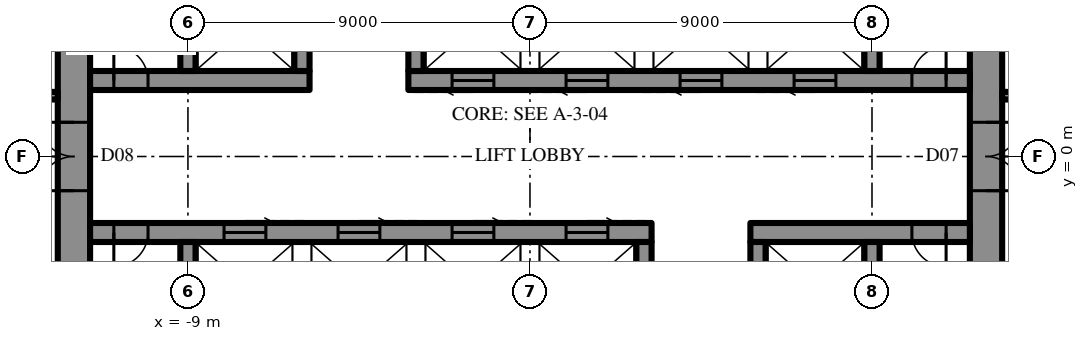
"""IFC4 building model, lengths in metres.
Left out: names, types, materials, properties, quantities, classifications, styles, units other than length and angle.
Written with IfcOpenShell. Run it as: python <this file> out.ifc"""

import sys

from ifc_helpers import new_model, si_unit, direction, frame, frame_2d, origin, place, context, subcontext, project, spatial, rectangle, extrude, element, fill, save


model = new_model("IFC4")
c1 = context("Model", 3, precision=1e-05, world=origin(), true_north=direction((0.0, 1.0)))
c2 = subcontext(c1, "Body", "Model", "MODEL_VIEW")
j1 = project(units=[si_unit("LENGTHUNIT", "METRE"), si_unit("PLANEANGLEUNIT", "RADIAN")], contexts=[c1])
p1 = place(None, origin())
s1 = spatial("IfcSite", under=j1, at=p1, CompositionType="ELEMENT")
p2 = place(p1, origin())
s2 = spatial("IfcBuilding", under=s1, at=p2, CompositionType="ELEMENT")
p3 = place(p2, frame((0.0, 0.0, 324.1)))
s3 = spatial("IfcBuildingStorey", under=s2, at=p3, CompositionType="ELEMENT", Elevation=324.1)
p4 = place(p3, frame((12.0, -10.7, 0.0), z_axis=(0.0, 0.0, 1.0), x_axis=(0.0, 1.0, 0.0)))
e1 = element("IfcWall", 1, at=p4, inside=s3, PredefinedType="SHEAR", context=c2, shape_type="SweptSolid", body=[
    extrude(rectangle(XDim=21.4, YDim=0.85, at=frame_2d((10.7, 0.0))), origin(), (0.0, 0.0, 1.0), 4.2),
])
p5 = place(p4, frame((9.8, 0.0, 0.0)))
e2 = element("IfcOpeningElement", 2, at=p5, cuts=e1, PredefinedType="OPENING", context=c2, shape_type="SweptSolid", body=[
    extrude(rectangle(XDim=1.8, YDim=2.4, at=frame_2d((0.9, 1.2))), frame((0.0, 0.435, 0.0), z_axis=(0.0, -1.0, 0.0), x_axis=(1.0, 0.0, 0.0)), (0.0, 0.0, 1.0), 0.87),
])
p6 = place(p3, frame((-12.0, 10.7, 0.0), z_axis=(0.0, 0.0, 1.0), x_axis=(0.0, -1.0, 0.0)))
e3 = element("IfcWall", 3, at=p6, inside=s3, PredefinedType="SHEAR", context=c2, shape_type="SweptSolid", body=[
    extrude(rectangle(XDim=21.4, YDim=0.85, at=frame_2d((10.7, 0.0))), origin(), (0.0, 0.0, 1.0), 4.2),
])
p7 = place(p6, frame((9.8, 0.0, 0.0)))
e4 = element("IfcOpeningElement", 4, at=p7, cuts=e3, PredefinedType="OPENING", context=c2, shape_type="SweptSolid", body=[
    extrude(rectangle(XDim=1.8, YDim=2.4, at=frame_2d((0.9, 1.2))), frame((0.0, 0.435, 0.0), z_axis=(0.0, -1.0, 0.0), x_axis=(1.0, 0.0, 0.0)), (0.0, 0.0, 1.0), 0.87),
])
p8 = place(p3, frame((-11.575, 2.0, 0.0), z_axis=(0.0, 0.0, 1.0), x_axis=(1.0, 0.0, 0.0)))
e5 = element("IfcWall", 5, at=p8, inside=s3, PredefinedType="SHEAR", context=c2, shape_type="SweptSolid", body=[
    extrude(rectangle(XDim=5.775, YDim=0.5, at=frame_2d((2.887, 0.0))), origin(), (0.0, 0.0, 1.0), 4.2),
])
p9 = place(p8, frame((0.625, 0.0, 0.0)))
e6 = element("IfcOpeningElement", 6, at=p9, cuts=e5, PredefinedType="OPENING", context=c2, shape_type="SweptSolid", body=[
    extrude(rectangle(XDim=0.9, YDim=2.2, at=frame_2d((0.45, 1.1))), frame((0.0, 0.26, 0.0), z_axis=(0.0, -1.0, 0.0), x_axis=(1.0, 0.0, 0.0)), (0.0, 0.0, 1.0), 0.52),
])
p10 = place(p3, frame((-3.2, 2.0, 0.0), z_axis=(0.0, 0.0, 1.0), x_axis=(1.0, 0.0, 0.0)))
e7 = element("IfcWall", 7, at=p10, inside=s3, PredefinedType="SHEAR", context=c2, shape_type="SweptSolid", body=[
    extrude(rectangle(XDim=14.775, YDim=0.5, at=frame_2d((7.387, 0.0))), origin(), (0.0, 0.0, 1.0), 4.2),
])
p11 = place(p10, frame((13.25, 0.0, 0.0)))
e8 = element("IfcOpeningElement", 8, at=p11, cuts=e7, PredefinedType="OPENING", context=c2, shape_type="SweptSolid", body=[
    extrude(rectangle(XDim=0.9, YDim=2.2, at=frame_2d((0.45, 1.1))), frame((0.0, 0.26, 0.0), z_axis=(0.0, -1.0, 0.0), x_axis=(1.0, 0.0, 0.0)), (0.0, 0.0, 1.0), 0.52),
])
p12 = place(p10, frame((1.15, 0.0, 0.0)))
e9 = element("IfcOpeningElement", 9, at=p12, cuts=e7, PredefinedType="OPENING", context=c2, shape_type="SweptSolid", body=[
    extrude(rectangle(XDim=1.1, YDim=2.2, at=frame_2d((0.55, 1.1))), frame((0.0, 0.26, 0.0), z_axis=(0.0, -1.0, 0.0), x_axis=(1.0, 0.0, 0.0)), (0.0, 0.0, 1.0), 0.52),
])
p13 = place(p10, frame((4.15, 0.0, 0.0)))
e10 = element("IfcOpeningElement", 10, at=p13, cuts=e7, PredefinedType="OPENING", context=c2, shape_type="SweptSolid", body=[
    extrude(rectangle(XDim=1.1, YDim=2.2, at=frame_2d((0.55, 1.1))), frame((0.0, 0.26, 0.0), z_axis=(0.0, -1.0, 0.0), x_axis=(1.0, 0.0, 0.0)), (0.0, 0.0, 1.0), 0.52),
])
p14 = place(p10, frame((7.15, 0.0, 0.0)))
e11 = element("IfcOpeningElement", 11, at=p14, cuts=e7, PredefinedType="OPENING", context=c2, shape_type="SweptSolid", body=[
    extrude(rectangle(XDim=1.1, YDim=2.2, at=frame_2d((0.55, 1.1))), frame((0.0, 0.26, 0.0), z_axis=(0.0, -1.0, 0.0), x_axis=(1.0, 0.0, 0.0)), (0.0, 0.0, 1.0), 0.52),
])
p15 = place(p10, frame((10.15, 0.0, 0.0)))
e12 = element("IfcOpeningElement", 12, at=p15, cuts=e7, PredefinedType="OPENING", context=c2, shape_type="SweptSolid", body=[
    extrude(rectangle(XDim=1.1, YDim=2.2, at=frame_2d((0.55, 1.1))), frame((0.0, 0.26, 0.0), z_axis=(0.0, -1.0, 0.0), x_axis=(1.0, 0.0, 0.0)), (0.0, 0.0, 1.0), 0.52),
])
for number, where, z_axis, x_axis in (
    (13, (-9.0, 2.25, 0.0), (0.0, 0.0, 1.0), (0.0, 1.0, 0.0)),
    (14, (-6.0, 2.25, 0.0), (0.0, 0.0, 1.0), (0.0, 1.0, 0.0)),
    (15, (-3.0, 2.25, 0.0), (0.0, 0.0, 1.0), (0.0, 1.0, 0.0)),
    (16, (9.0, 2.25, 0.0), (0.0, 0.0, 1.0), (0.0, 1.0, 0.0)),
):
    element("IfcWall", number, at=place(p3, frame(where, z_axis=z_axis, x_axis=x_axis)), inside=s3, PredefinedType="SHEAR", context=c2, shape_type="SweptSolid", body=[
        extrude(rectangle(XDim=2.3, YDim=0.4, at=frame_2d((1.15, 0.0))), origin(), (0.0, 0.0, 1.0), 4.2),
    ])
p16 = place(p3, frame((11.575, -2.0, 0.0), z_axis=(0.0, 0.0, 1.0), x_axis=(-1.0, 0.0, 0.0)))
e17 = element("IfcWall", 17, at=p16, inside=s3, PredefinedType="SHEAR", context=c2, shape_type="SweptSolid", body=[
    extrude(rectangle(XDim=5.775, YDim=0.5, at=frame_2d((2.887, 0.0))), origin(), (0.0, 0.0, 1.0), 4.2),
])
p17 = place(p16, frame((0.625, 0.0, 0.0)))
e18 = element("IfcOpeningElement", 18, at=p17, cuts=e17, PredefinedType="OPENING", context=c2, shape_type="SweptSolid", body=[
    extrude(rectangle(XDim=0.9, YDim=2.2, at=frame_2d((0.45, 1.1))), frame((0.0, 0.26, 0.0), z_axis=(0.0, -1.0, 0.0), x_axis=(1.0, 0.0, 0.0)), (0.0, 0.0, 1.0), 0.52),
])
p18 = place(p3, frame((3.2, -2.0, 0.0), z_axis=(0.0, 0.0, 1.0), x_axis=(-1.0, 0.0, 0.0)))
e19 = element("IfcWall", 19, at=p18, inside=s3, PredefinedType="SHEAR", context=c2, shape_type="SweptSolid", body=[
    extrude(rectangle(XDim=14.775, YDim=0.5, at=frame_2d((7.387, 0.0))), origin(), (0.0, 0.0, 1.0), 4.2),
])
p19 = place(p18, frame((13.25, 0.0, 0.0)))
e20 = element("IfcOpeningElement", 20, at=p19, cuts=e19, PredefinedType="OPENING", context=c2, shape_type="SweptSolid", body=[
    extrude(rectangle(XDim=0.9, YDim=2.2, at=frame_2d((0.45, 1.1))), frame((0.0, 0.26, 0.0), z_axis=(0.0, -1.0, 0.0), x_axis=(1.0, 0.0, 0.0)), (0.0, 0.0, 1.0), 0.52),
])
p20 = place(p18, frame((1.15, 0.0, 0.0)))
e21 = element("IfcOpeningElement", 21, at=p20, cuts=e19, PredefinedType="OPENING", context=c2, shape_type="SweptSolid", body=[
    extrude(rectangle(XDim=1.1, YDim=2.2, at=frame_2d((0.55, 1.1))), frame((0.0, 0.26, 0.0), z_axis=(0.0, -1.0, 0.0), x_axis=(1.0, 0.0, 0.0)), (0.0, 0.0, 1.0), 0.52),
])
p21 = place(p18, frame((4.15, 0.0, 0.0)))
e22 = element("IfcOpeningElement", 22, at=p21, cuts=e19, PredefinedType="OPENING", context=c2, shape_type="SweptSolid", body=[
    extrude(rectangle(XDim=1.1, YDim=2.2, at=frame_2d((0.55, 1.1))), frame((0.0, 0.26, 0.0), z_axis=(0.0, -1.0, 0.0), x_axis=(1.0, 0.0, 0.0)), (0.0, 0.0, 1.0), 0.52),
])
p22 = place(p18, frame((7.15, 0.0, 0.0)))
e23 = element("IfcOpeningElement", 23, at=p22, cuts=e19, PredefinedType="OPENING", context=c2, shape_type="SweptSolid", body=[
    extrude(rectangle(XDim=1.1, YDim=2.2, at=frame_2d((0.55, 1.1))), frame((0.0, 0.26, 0.0), z_axis=(0.0, -1.0, 0.0), x_axis=(1.0, 0.0, 0.0)), (0.0, 0.0, 1.0), 0.52),
])
p23 = place(p18, frame((10.15, 0.0, 0.0)))
e24 = element("IfcOpeningElement", 24, at=p23, cuts=e19, PredefinedType="OPENING", context=c2, shape_type="SweptSolid", body=[
    extrude(rectangle(XDim=1.1, YDim=2.2, at=frame_2d((0.55, 1.1))), frame((0.0, 0.26, 0.0), z_axis=(0.0, -1.0, 0.0), x_axis=(1.0, 0.0, 0.0)), (0.0, 0.0, 1.0), 0.52),
])
for number, where, z_axis, x_axis in (
    (25, (9.0, -2.25, 0.0), (0.0, 0.0, 1.0), (0.0, -1.0, 0.0)),
    (26, (6.0, -2.25, 0.0), (0.0, 0.0, 1.0), (0.0, -1.0, 0.0)),
    (27, (3.0, -2.25, 0.0), (0.0, 0.0, 1.0), (0.0, -1.0, 0.0)),
    (28, (-9.0, -2.25, 0.0), (0.0, 0.0, 1.0), (0.0, -1.0, 0.0)),
):
    element("IfcWall", number, at=place(p3, frame(where, z_axis=z_axis, x_axis=x_axis)), inside=s3, PredefinedType="SHEAR", context=c2, shape_type="SweptSolid", body=[
        extrude(rectangle(XDim=2.3, YDim=0.4, at=frame_2d((1.15, 0.0))), origin(), (0.0, 0.0, 1.0), 4.2),
    ])
p24 = place(p3, frame((12.425, 1.6, 0.0), z_axis=(0.0, 0.0, 1.0), x_axis=(1.0, 0.0, 0.0)))
e29 = element("IfcWall", 29, at=p24, inside=s3, PredefinedType="PARTITIONING", context=c2, shape_type="SweptSolid", body=[
    extrude(rectangle(XDim=16.327, YDim=0.2, at=frame_2d((8.164, 0.0))), origin(), (0.0, 0.0, 1.0), 4.0),
])
p25 = place(p24, frame((1.133, 0.0, 0.0)))
e30 = element("IfcOpeningElement", 30, at=p25, cuts=e29, PredefinedType="OPENING", context=c2, shape_type="SweptSolid", body=[
    extrude(rectangle(XDim=1.0, YDim=2.2, at=frame_2d((0.5, 1.1))), frame((0.0, 0.11, 0.0), z_axis=(0.0, -1.0, 0.0), x_axis=(1.0, 0.0, 0.0)), (0.0, 0.0, 1.0), 0.22),
])
p26 = place(p3, frame((-12.425, 1.6, 0.0), z_axis=(0.0, 0.0, 1.0), x_axis=(-1.0, 0.0, 0.0)))
e31 = element("IfcWall", 31, at=p26, inside=s3, PredefinedType="PARTITIONING", context=c2, shape_type="SweptSolid", body=[
    extrude(rectangle(XDim=16.327, YDim=0.2, at=frame_2d((8.164, 0.0))), origin(), (0.0, 0.0, 1.0), 4.0),
])
p27 = place(p26, frame((1.133, 0.0, 0.0)))
e32 = element("IfcOpeningElement", 32, at=p27, cuts=e31, PredefinedType="OPENING", context=c2, shape_type="SweptSolid", body=[
    extrude(rectangle(XDim=1.0, YDim=2.2, at=frame_2d((0.5, 1.1))), frame((0.0, 0.11, 0.0), z_axis=(0.0, -1.0, 0.0), x_axis=(1.0, 0.0, 0.0)), (0.0, 0.0, 1.0), 0.22),
])
p28 = place(p5, frame((1.8, 0.0, 0.0), z_axis=(0.0, 0.0, 1.0), x_axis=(-1.0, 0.0, 0.0)))
e33 = element("IfcDoor", 33, at=p28, inside=s3, OperationType="DOUBLE_DOOR_SINGLE_SWING", PredefinedType="DOOR", context=c2, shape_type="SweptSolid", body=[
    extrude(rectangle(XDim=1.8, YDim=2.4, at=frame_2d((0.9, 1.2))), frame((0.0, 0.025, 0.0), z_axis=(0.0, -1.0, 0.0), x_axis=(1.0, 0.0, 0.0)), (0.0, 0.0, 1.0), 0.05),
])
fill(e2, e33)
p29 = place(p7, frame((1.8, 0.0, 0.0), z_axis=(0.0, 0.0, 1.0), x_axis=(-1.0, 0.0, 0.0)))
e34 = element("IfcDoor", 34, at=p29, inside=s3, OperationType="DOUBLE_DOOR_SINGLE_SWING", PredefinedType="DOOR", context=c2, shape_type="SweptSolid", body=[
    extrude(rectangle(XDim=1.8, YDim=2.4, at=frame_2d((0.9, 1.2))), frame((0.0, 0.025, 0.0), z_axis=(0.0, -1.0, 0.0), x_axis=(1.0, 0.0, 0.0)), (0.0, 0.0, 1.0), 0.05),
])
fill(e4, e34)
p30 = place(p9, origin())
e35 = element("IfcDoor", 35, at=p30, inside=s3, OperationType="SINGLE_SWING_RIGHT", PredefinedType="DOOR", context=c2, shape_type="SweptSolid", body=[
    extrude(rectangle(XDim=0.9, YDim=2.2, at=frame_2d((0.45, 1.1))), frame((0.0, 0.025, 0.0), z_axis=(0.0, -1.0, 0.0), x_axis=(1.0, 0.0, 0.0)), (0.0, 0.0, 1.0), 0.05),
])
fill(e6, e35)
p31 = place(p11, origin())
e36 = element("IfcDoor", 36, at=p31, inside=s3, OperationType="SINGLE_SWING_LEFT", PredefinedType="DOOR", context=c2, shape_type="SweptSolid", body=[
    extrude(rectangle(XDim=0.9, YDim=2.2, at=frame_2d((0.45, 1.1))), frame((0.0, 0.025, 0.0), z_axis=(0.0, -1.0, 0.0), x_axis=(1.0, 0.0, 0.0)), (0.0, 0.0, 1.0), 0.05),
])
fill(e8, e36)
p32 = place(p17, origin())
e37 = element("IfcDoor", 37, at=p32, inside=s3, OperationType="SINGLE_SWING_RIGHT", PredefinedType="DOOR", context=c2, shape_type="SweptSolid", body=[
    extrude(rectangle(XDim=0.9, YDim=2.2, at=frame_2d((0.45, 1.1))), frame((0.0, 0.025, 0.0), z_axis=(0.0, -1.0, 0.0), x_axis=(1.0, 0.0, 0.0)), (0.0, 0.0, 1.0), 0.05),
])
fill(e18, e37)
p33 = place(p19, origin())
e38 = element("IfcDoor", 38, at=p33, inside=s3, OperationType="SINGLE_SWING_LEFT", PredefinedType="DOOR", context=c2, shape_type="SweptSolid", body=[
    extrude(rectangle(XDim=0.9, YDim=2.2, at=frame_2d((0.45, 1.1))), frame((0.0, 0.025, 0.0), z_axis=(0.0, -1.0, 0.0), x_axis=(1.0, 0.0, 0.0)), (0.0, 0.0, 1.0), 0.05),
])
fill(e20, e38)
p34 = place(p12, frame((1.1, 0.0, 0.0), z_axis=(0.0, 0.0, 1.0), x_axis=(-1.0, 0.0, 0.0)))
e39 = element("IfcDoor", 39, at=p34, inside=s3, OperationType="SLIDING_TO_LEFT", PredefinedType="DOOR", context=c2, shape_type="SweptSolid", body=[
    extrude(rectangle(XDim=1.1, YDim=2.2, at=frame_2d((0.55, 1.1))), frame((0.0, 0.025, 0.0), z_axis=(0.0, -1.0, 0.0), x_axis=(1.0, 0.0, 0.0)), (0.0, 0.0, 1.0), 0.05),
])
fill(e9, e39)
p35 = place(p13, frame((1.1, 0.0, 0.0), z_axis=(0.0, 0.0, 1.0), x_axis=(-1.0, 0.0, 0.0)))
e40 = element("IfcDoor", 40, at=p35, inside=s3, OperationType="SLIDING_TO_LEFT", PredefinedType="DOOR", context=c2, shape_type="SweptSolid", body=[
    extrude(rectangle(XDim=1.1, YDim=2.2, at=frame_2d((0.55, 1.1))), frame((0.0, 0.025, 0.0), z_axis=(0.0, -1.0, 0.0), x_axis=(1.0, 0.0, 0.0)), (0.0, 0.0, 1.0), 0.05),
])
fill(e10, e40)
p36 = place(p14, frame((1.1, 0.0, 0.0), z_axis=(0.0, 0.0, 1.0), x_axis=(-1.0, 0.0, 0.0)))
e41 = element("IfcDoor", 41, at=p36, inside=s3, OperationType="SLIDING_TO_LEFT", PredefinedType="DOOR", context=c2, shape_type="SweptSolid", body=[
    extrude(rectangle(XDim=1.1, YDim=2.2, at=frame_2d((0.55, 1.1))), frame((0.0, 0.025, 0.0), z_axis=(0.0, -1.0, 0.0), x_axis=(1.0, 0.0, 0.0)), (0.0, 0.0, 1.0), 0.05),
])
fill(e11, e41)
p37 = place(p15, frame((1.1, 0.0, 0.0), z_axis=(0.0, 0.0, 1.0), x_axis=(-1.0, 0.0, 0.0)))
e42 = element("IfcDoor", 42, at=p37, inside=s3, OperationType="SLIDING_TO_LEFT", PredefinedType="DOOR", context=c2, shape_type="SweptSolid", body=[
    extrude(rectangle(XDim=1.1, YDim=2.2, at=frame_2d((0.55, 1.1))), frame((0.0, 0.025, 0.0), z_axis=(0.0, -1.0, 0.0), x_axis=(1.0, 0.0, 0.0)), (0.0, 0.0, 1.0), 0.05),
])
fill(e12, e42)
p38 = place(p20, frame((1.1, 0.0, 0.0), z_axis=(0.0, 0.0, 1.0), x_axis=(-1.0, 0.0, 0.0)))
e43 = element("IfcDoor", 43, at=p38, inside=s3, OperationType="SLIDING_TO_LEFT", PredefinedType="DOOR", context=c2, shape_type="SweptSolid", body=[
    extrude(rectangle(XDim=1.1, YDim=2.2, at=frame_2d((0.55, 1.1))), frame((0.0, 0.025, 0.0), z_axis=(0.0, -1.0, 0.0), x_axis=(1.0, 0.0, 0.0)), (0.0, 0.0, 1.0), 0.05),
])
fill(e21, e43)
p39 = place(p21, frame((1.1, 0.0, 0.0), z_axis=(0.0, 0.0, 1.0), x_axis=(-1.0, 0.0, 0.0)))
e44 = element("IfcDoor", 44, at=p39, inside=s3, OperationType="SLIDING_TO_LEFT", PredefinedType="DOOR", context=c2, shape_type="SweptSolid", body=[
    extrude(rectangle(XDim=1.1, YDim=2.2, at=frame_2d((0.55, 1.1))), frame((0.0, 0.025, 0.0), z_axis=(0.0, -1.0, 0.0), x_axis=(1.0, 0.0, 0.0)), (0.0, 0.0, 1.0), 0.05),
])
fill(e22, e44)
p40 = place(p22, frame((1.1, 0.0, 0.0), z_axis=(0.0, 0.0, 1.0), x_axis=(-1.0, 0.0, 0.0)))
e45 = element("IfcDoor", 45, at=p40, inside=s3, OperationType="SLIDING_TO_LEFT", PredefinedType="DOOR", context=c2, shape_type="SweptSolid", body=[
    extrude(rectangle(XDim=1.1, YDim=2.2, at=frame_2d((0.55, 1.1))), frame((0.0, 0.025, 0.0), z_axis=(0.0, -1.0, 0.0), x_axis=(1.0, 0.0, 0.0)), (0.0, 0.0, 1.0), 0.05),
])
fill(e23, e45)
p41 = place(p23, frame((1.1, 0.0, 0.0), z_axis=(0.0, 0.0, 1.0), x_axis=(-1.0, 0.0, 0.0)))
e46 = element("IfcDoor", 46, at=p41, inside=s3, OperationType="SLIDING_TO_LEFT", PredefinedType="DOOR", context=c2, shape_type="SweptSolid", body=[
    extrude(rectangle(XDim=1.1, YDim=2.2, at=frame_2d((0.55, 1.1))), frame((0.0, 0.025, 0.0), z_axis=(0.0, -1.0, 0.0), x_axis=(1.0, 0.0, 0.0)), (0.0, 0.0, 1.0), 0.05),
])
fill(e24, e46)
save(model, sys.argv[1])
